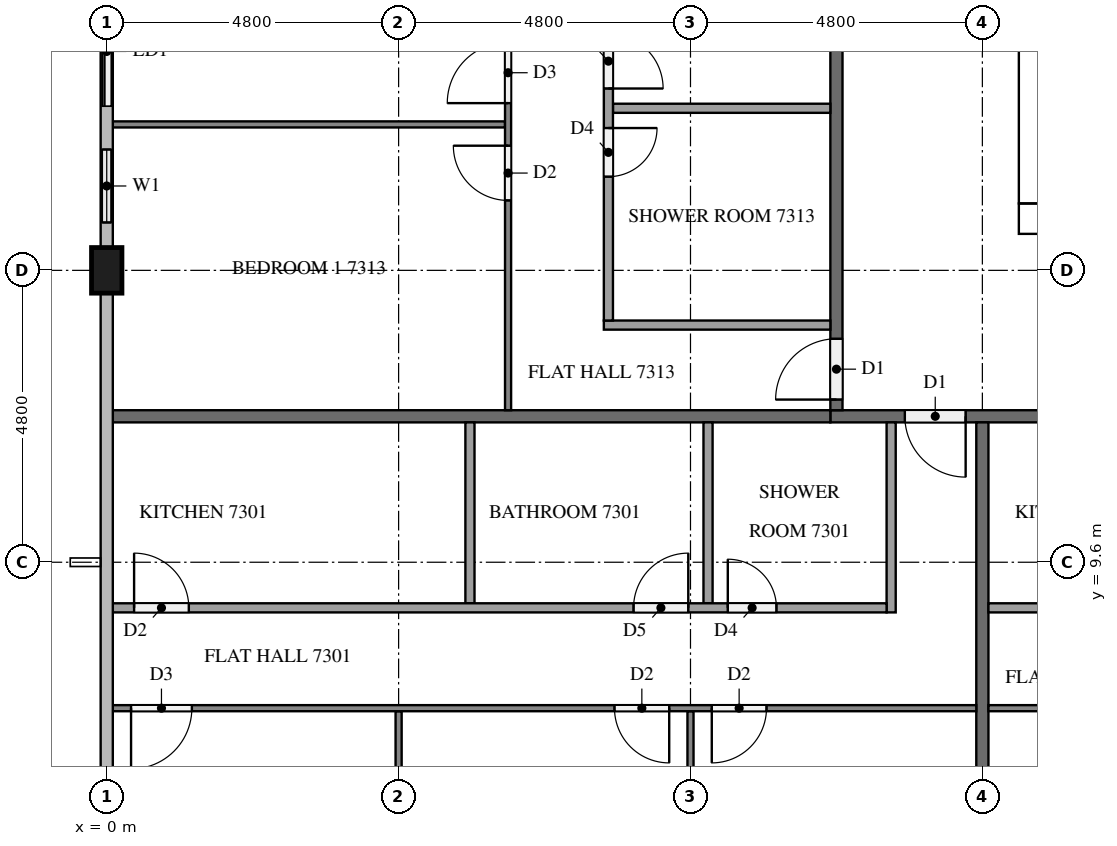
"""IFC4 building model, lengths in metres.
Left out: names, types, materials, properties, quantities, classifications, styles, units other than length and angle.
Written with IfcOpenShell. Run it as: python <this file> out.ifc"""

import sys

from ifc_helpers import new_model, si_unit, direction, frame, frame_2d, origin, origin_2d, place, context, subcontext, project, spatial, rectangle, extrude, element, fill, save


model = new_model("IFC4")
c1 = context("Model", 3, precision=1e-05, world=origin(), true_north=direction((0.0, 1.0)))
c2 = subcontext(c1, "Body", "Model", "MODEL_VIEW")
j1 = project(units=[si_unit("LENGTHUNIT", "METRE"), si_unit("PLANEANGLEUNIT", "RADIAN")], contexts=[c1])
p1 = place(None, origin())
s1 = spatial("IfcSite", under=j1, at=p1, CompositionType="ELEMENT")
p2 = place(p1, origin())
s2 = spatial("IfcBuilding", under=s1, at=p2, CompositionType="ELEMENT")
p3 = place(p2, frame((0.0, 0.0, 279.1)))
s3 = spatial("IfcBuildingStorey", under=s2, at=p3, CompositionType="ELEMENT", Elevation=279.1)
p4 = place(p3, frame((15.0, 15.25, 0.0), z_axis=(0.0, 0.0, 1.0), x_axis=(1.0, 0.0, 0.0)))
e1 = element("IfcWall", 1, at=p4, inside=s3, PredefinedType="SHEAR", context=c2, shape_type="SweptSolid", body=[
    extrude(rectangle(XDim=32.4, YDim=0.5, at=frame_2d((16.2, 0.0))), origin(), (0.0, 0.0, 1.0), 3.2),
])
p5 = place(p4, frame((15.3, 0.0, 0.0)))
e2 = element("IfcOpeningElement", 2, at=p5, cuts=e1, PredefinedType="OPENING", context=c2, shape_type="SweptSolid", body=[
    extrude(rectangle(XDim=1.8, YDim=2.1, at=frame_2d((0.9, 1.05))), frame((0.0, 0.26, 0.0), z_axis=(0.0, -1.0, 0.0), x_axis=(1.0, 0.0, 0.0)), (0.0, 0.0, 1.0), 0.52),
])
p6 = place(p3, frame((15.25, 15.5, 0.0), z_axis=(0.0, 0.0, 1.0), x_axis=(0.0, 1.0, 0.0)))
e3 = element("IfcWall", 3, at=p6, inside=s3, PredefinedType="SHEAR", context=c2, shape_type="SweptSolid", body=[
    extrude(rectangle(XDim=21.8, YDim=0.5, at=frame_2d((10.9, 0.0))), origin(), (0.0, 0.0, 1.0), 3.2),
])
p7 = place(p6, frame((5.26, 0.0, 0.0)))
e4 = element("IfcOpeningElement", 4, at=p7, cuts=e3, PredefinedType="OPENING", context=c2, shape_type="SweptSolid", body=[
    extrude(rectangle(XDim=1.2, YDim=2.1, at=frame_2d((0.6, 1.05))), frame((0.0, 0.26, 0.0), z_axis=(0.0, -1.0, 0.0), x_axis=(1.0, 0.0, 0.0)), (0.0, 0.0, 1.0), 0.52),
])
p8 = place(p3, frame((0.0, 14.4, 0.0), z_axis=(0.0, 0.0, 1.0), x_axis=(0.0, 1.0, 0.0)))
e5 = element("IfcColumn", 5, at=p8, inside=s3, PredefinedType="COLUMN", context=c2, shape_type="SweptSolid", body=[
    extrude(rectangle(XDim=0.75, YDim=0.5, at=origin_2d()), origin(), (0.0, 0.0, 1.0), 3.2),
])
p9 = place(p3, frame((0.0, 19.2, 0.0), z_axis=(0.0, 0.0, 1.0), x_axis=(0.0, -1.0, 0.0)))
e6 = element("IfcWall", 6, at=p9, inside=s3, PredefinedType="SOLIDWALL", context=c2, shape_type="SweptSolid", body=[
    extrude(rectangle(XDim=4.425, YDim=0.15, at=frame_2d((2.212, 0.0))), origin(), (0.0, 0.0, 1.0), 3.2),
])
p10 = place(p9, frame((0.3, 0.0, 0.0)))
e7 = element("IfcOpeningElement", 7, at=p10, cuts=e6, PredefinedType="OPENING", context=c2, shape_type="SweptSolid", body=[
    extrude(rectangle(XDim=1.8, YDim=2.4, at=frame_2d((0.9, 1.2))), frame((0.0, 0.085, 0.0), z_axis=(0.0, -1.0, 0.0), x_axis=(1.0, 0.0, 0.0)), (0.0, 0.0, 1.0), 0.17),
])
p11 = place(p9, frame((2.812, 0.0, 0.9)))
e8 = element("IfcOpeningElement", 8, at=p11, cuts=e6, PredefinedType="OPENING", context=c2, shape_type="SweptSolid", body=[
    extrude(rectangle(XDim=1.2, YDim=1.4, at=frame_2d((0.6, 0.7))), frame((0.0, 0.085, 0.0), z_axis=(0.0, -1.0, 0.0), x_axis=(1.0, 0.0, 0.0)), (0.0, 0.0, 1.0), 0.17),
])
p12 = place(p3, frame((50.5, 12.0, 0.0), z_axis=(0.0, 0.0, 1.0), x_axis=(-1.0, 0.0, 0.0)))
e9 = element("IfcWall", 9, at=p12, inside=s3, PredefinedType="PARTITIONING", context=c2, shape_type="SweptSolid", body=[
    extrude(rectangle(XDim=38.6, YDim=0.2, at=frame_2d((19.3, 0.0))), origin(), (0.0, 0.0, 1.0), 3.2),
])
p13 = place(p12, frame((36.375, 0.0, 0.0)))
e10 = element("IfcOpeningElement", 10, at=p13, cuts=e9, PredefinedType="OPENING", context=c2, shape_type="SweptSolid", body=[
    extrude(rectangle(XDim=1.0, YDim=2.1, at=frame_2d((0.5, 1.05))), frame((0.0, 0.11, 0.0), z_axis=(0.0, -1.0, 0.0), x_axis=(1.0, 0.0, 0.0)), (0.0, 0.0, 1.0), 0.22),
])
p14 = place(p12, frame((29.175, 0.0, 0.0)))
e11 = element("IfcOpeningElement", 11, at=p14, cuts=e9, PredefinedType="OPENING", context=c2, shape_type="SweptSolid", body=[
    extrude(rectangle(XDim=1.0, YDim=2.1, at=frame_2d((0.5, 1.05))), frame((0.0, 0.11, 0.0), z_axis=(0.0, -1.0, 0.0), x_axis=(1.0, 0.0, 0.0)), (0.0, 0.0, 1.0), 0.22),
])
p15 = place(p12, frame((27.625, 0.0, 0.0)))
e12 = element("IfcOpeningElement", 12, at=p15, cuts=e9, PredefinedType="OPENING", context=c2, shape_type="SweptSolid", body=[
    extrude(rectangle(XDim=1.0, YDim=2.1, at=frame_2d((0.5, 1.05))), frame((0.0, 0.11, 0.0), z_axis=(0.0, -1.0, 0.0), x_axis=(1.0, 0.0, 0.0)), (0.0, 0.0, 1.0), 0.22),
])
p16 = place(p12, frame((2.775, 0.0, 0.0)))
e13 = element("IfcOpeningElement", 13, at=p16, cuts=e9, PredefinedType="OPENING", context=c2, shape_type="SweptSolid", body=[
    extrude(rectangle(XDim=1.0, YDim=2.1, at=frame_2d((0.5, 1.05))), frame((0.0, 0.11, 0.0), z_axis=(0.0, -1.0, 0.0), x_axis=(1.0, 0.0, 0.0)), (0.0, 0.0, 1.0), 0.22),
])
p17 = place(p12, frame((1.225, 0.0, 0.0)))
e14 = element("IfcOpeningElement", 14, at=p17, cuts=e9, PredefinedType="OPENING", context=c2, shape_type="SweptSolid", body=[
    extrude(rectangle(XDim=1.0, YDim=2.1, at=frame_2d((0.5, 1.05))), frame((0.0, 0.11, 0.0), z_axis=(0.0, -1.0, 0.0), x_axis=(1.0, 0.0, 0.0)), (0.0, 0.0, 1.0), 0.22),
])
p18 = place(p3, frame((12.0, 12.1, 0.0), z_axis=(0.0, 0.0, 1.0), x_axis=(0.0, 1.0, 0.0)))
e15 = element("IfcWall", 15, at=p18, inside=s3, PredefinedType="PARTITIONING", context=c2, shape_type="SweptSolid", body=[
    extrude(rectangle(XDim=28.6, YDim=0.2, at=frame_2d((14.3, 0.0))), origin(), (0.0, 0.0, 1.0), 3.2),
])
p19 = place(p18, frame((16.975, 0.0, 0.0)))
e16 = element("IfcOpeningElement", 16, at=p19, cuts=e15, PredefinedType="OPENING", context=c2, shape_type="SweptSolid", body=[
    extrude(rectangle(XDim=1.0, YDim=2.1, at=frame_2d((0.5, 1.05))), frame((0.0, 0.11, 0.0), z_axis=(0.0, -1.0, 0.0), x_axis=(1.0, 0.0, 0.0)), (0.0, 0.0, 1.0), 0.22),
])
p20 = place(p18, frame((0.175, 0.0, 0.0)))
e17 = element("IfcOpeningElement", 17, at=p20, cuts=e15, PredefinedType="OPENING", context=c2, shape_type="SweptSolid", body=[
    extrude(rectangle(XDim=1.0, YDim=2.1, at=frame_2d((0.5, 1.05))), frame((0.0, 0.11, 0.0), z_axis=(0.0, -1.0, 0.0), x_axis=(1.0, 0.0, 0.0)), (0.0, 0.0, 1.0), 0.22),
])
p21 = place(p3, frame((14.4, 11.9, 0.0), z_axis=(0.0, 0.0, 1.0), x_axis=(0.0, -1.0, 0.0)))
e18 = element("IfcWall", 18, at=p21, inside=s3, PredefinedType="PARTITIONING", context=c2, shape_type="SweptSolid", body=[
    extrude(rectangle(XDim=11.65, YDim=0.2, at=frame_2d((5.825, 0.0))), origin(), (0.0, 0.0, 1.0), 3.2),
])
p22 = place(p3, frame((0.1, 12.0, 0.0), z_axis=(0.0, 0.0, 1.0), x_axis=(1.0, 0.0, 0.0)))
e19 = element("IfcWall", 19, at=p22, inside=s3, PredefinedType="PARTITIONING", context=c2, shape_type="SweptSolid", body=[
    extrude(rectangle(XDim=11.8, YDim=0.2, at=frame_2d((5.9, 0.0))), origin(), (0.0, 0.0, 1.0), 3.2),
])
p23 = place(p3, frame((9.6, 7.15, 0.0), z_axis=(0.0, 0.0, 1.0), x_axis=(0.0, -1.0, 0.0)))
e20 = element("IfcWall", 20, at=p23, inside=s3, PredefinedType="PARTITIONING", context=c2, shape_type="SweptSolid", body=[
    extrude(rectangle(XDim=7.05, YDim=0.1, at=frame_2d((3.525, 0.0))), origin(), (0.0, 0.0, 1.0), 3.2),
])
p24 = place(p3, frame((4.8, 7.15, 0.0), z_axis=(0.0, 0.0, 1.0), x_axis=(0.0, -1.0, 0.0)))
e21 = element("IfcWall", 21, at=p24, inside=s3, PredefinedType="PARTITIONING", context=c2, shape_type="SweptSolid", body=[
    extrude(rectangle(XDim=6.85, YDim=0.1, at=frame_2d((3.425, 0.0))), origin(), (0.0, 0.0, 1.0), 3.2),
])
p25 = place(p3, frame((14.3, 7.2, 0.0), z_axis=(0.0, 0.0, 1.0), x_axis=(-1.0, 0.0, 0.0)))
e22 = element("IfcWall", 22, at=p25, inside=s3, PredefinedType="PARTITIONING", context=c2, shape_type="SweptSolid", body=[
    extrude(rectangle(XDim=14.2, YDim=0.1, at=frame_2d((7.1, 0.0))), origin(), (0.0, 0.0, 1.0), 3.2),
])
p26 = place(p25, frame((3.45, 0.0, 0.0)))
e23 = element("IfcOpeningElement", 23, at=p26, cuts=e22, PredefinedType="OPENING", context=c2, shape_type="SweptSolid", body=[
    extrude(rectangle(XDim=0.9, YDim=2.1, at=frame_2d((0.45, 1.05))), frame((0.0, 0.06, 0.0), z_axis=(0.0, -1.0, 0.0), x_axis=(1.0, 0.0, 0.0)), (0.0, 0.0, 1.0), 0.12),
])
p27 = place(p25, frame((5.05, 0.0, 0.0)))
e24 = element("IfcOpeningElement", 24, at=p27, cuts=e22, PredefinedType="OPENING", context=c2, shape_type="SweptSolid", body=[
    extrude(rectangle(XDim=0.9, YDim=2.1, at=frame_2d((0.45, 1.05))), frame((0.0, 0.06, 0.0), z_axis=(0.0, -1.0, 0.0), x_axis=(1.0, 0.0, 0.0)), (0.0, 0.0, 1.0), 0.12),
])
p28 = place(p25, frame((12.9, 0.0, 0.0)))
e25 = element("IfcOpeningElement", 25, at=p28, cuts=e22, PredefinedType="OPENING", context=c2, shape_type="SweptSolid", body=[
    extrude(rectangle(XDim=1.0, YDim=2.1, at=frame_2d((0.5, 1.05))), frame((0.0, 0.06, 0.0), z_axis=(0.0, -1.0, 0.0), x_axis=(1.0, 0.0, 0.0)), (0.0, 0.0, 1.0), 0.12),
])
for number, where, z_axis, x_axis in (
    (26, (9.888, 11.9, 0.0), (0.0, 0.0, 1.0), (0.0, -1.0, 0.0)),
    (27, (5.973, 11.9, 0.0), (0.0, 0.0, 1.0), (0.0, -1.0, 0.0)),
):
    element("IfcWall", number, at=place(p3, frame(where, z_axis=z_axis, x_axis=x_axis)), inside=s3, PredefinedType="PARTITIONING", context=c2, shape_type="SweptSolid", body=[
        extrude(rectangle(XDim=2.975, YDim=0.15, at=frame_2d((1.487, 0.0))), origin(), (0.0, 0.0, 1.0), 3.2),
    ])
p29 = place(p3, frame((12.9, 11.9, 0.0), z_axis=(0.0, 0.0, 1.0), x_axis=(0.0, -1.0, 0.0)))
e28 = element("IfcWall", 28, at=p29, inside=s3, PredefinedType="PARTITIONING", context=c2, shape_type="SweptSolid", body=[
    extrude(rectangle(XDim=3.125, YDim=0.15, at=frame_2d((1.562, 0.0))), origin(), (0.0, 0.0, 1.0), 3.2),
])
p30 = place(p3, frame((0.1, 8.85, 0.0), z_axis=(0.0, 0.0, 1.0), x_axis=(1.0, 0.0, 0.0)))
e29 = element("IfcWall", 29, at=p30, inside=s3, PredefinedType="PARTITIONING", context=c2, shape_type="SweptSolid", body=[
    extrude(rectangle(XDim=12.725, YDim=0.15, at=frame_2d((6.362, 0.0))), origin(), (0.0, 0.0, 1.0), 3.2),
])
p31 = place(p30, frame((10.114, 0.0, 0.0)))
e30 = element("IfcOpeningElement", 30, at=p31, cuts=e29, PredefinedType="OPENING", context=c2, shape_type="SweptSolid", body=[
    extrude(rectangle(XDim=0.8, YDim=2.1, at=frame_2d((0.4, 1.05))), frame((0.0, 0.085, 0.0), z_axis=(0.0, -1.0, 0.0), x_axis=(1.0, 0.0, 0.0)), (0.0, 0.0, 1.0), 0.17),
])
p32 = place(p30, frame((8.563, 0.0, 0.0)))
e31 = element("IfcOpeningElement", 31, at=p32, cuts=e29, PredefinedType="OPENING", context=c2, shape_type="SweptSolid", body=[
    extrude(rectangle(XDim=0.9, YDim=2.1, at=frame_2d((0.45, 1.05))), frame((0.0, 0.085, 0.0), z_axis=(0.0, -1.0, 0.0), x_axis=(1.0, 0.0, 0.0)), (0.0, 0.0, 1.0), 0.17),
])
p33 = place(p30, frame((0.35, 0.0, 0.0)))
e32 = element("IfcOpeningElement", 32, at=p33, cuts=e29, PredefinedType="OPENING", context=c2, shape_type="SweptSolid", body=[
    extrude(rectangle(XDim=0.9, YDim=2.1, at=frame_2d((0.45, 1.05))), frame((0.0, 0.085, 0.0), z_axis=(0.0, -1.0, 0.0), x_axis=(1.0, 0.0, 0.0)), (0.0, 0.0, 1.0), 0.17),
])
p34 = place(p3, frame((21.5, 7.2, 0.0), z_axis=(0.0, 0.0, 1.0), x_axis=(-1.0, 0.0, 0.0)))
e33 = element("IfcWall", 33, at=p34, inside=s3, PredefinedType="PARTITIONING", context=c2, shape_type="SweptSolid", body=[
    extrude(rectangle(XDim=7.0, YDim=0.1, at=frame_2d((3.5, 0.0))), origin(), (0.0, 0.0, 1.0), 3.2),
])
p35 = place(p34, frame((0.3, 0.0, 0.0)))
e34 = element("IfcOpeningElement", 34, at=p35, cuts=e33, PredefinedType="OPENING", context=c2, shape_type="SweptSolid", body=[
    extrude(rectangle(XDim=1.0, YDim=2.1, at=frame_2d((0.5, 1.05))), frame((0.0, 0.06, 0.0), z_axis=(0.0, -1.0, 0.0), x_axis=(1.0, 0.0, 0.0)), (0.0, 0.0, 1.0), 0.12),
])
p36 = place(p3, frame((14.5, 8.85, 0.0), z_axis=(0.0, 0.0, 1.0), x_axis=(1.0, 0.0, 0.0)))
e35 = element("IfcWall", 35, at=p36, inside=s3, PredefinedType="PARTITIONING", context=c2, shape_type="SweptSolid", body=[
    extrude(rectangle(XDim=5.525, YDim=0.15, at=frame_2d((2.762, 0.0))), origin(), (0.0, 0.0, 1.0), 3.2),
])
p37 = place(p36, frame((3.64, 0.0, 0.0)))
e36 = element("IfcOpeningElement", 36, at=p37, cuts=e35, PredefinedType="OPENING", context=c2, shape_type="SweptSolid", body=[
    extrude(rectangle(XDim=0.8, YDim=2.1, at=frame_2d((0.4, 1.05))), frame((0.0, 0.085, 0.0), z_axis=(0.0, -1.0, 0.0), x_axis=(1.0, 0.0, 0.0)), (0.0, 0.0, 1.0), 0.17),
])
p38 = place(p36, frame((2.09, 0.0, 0.0)))
e37 = element("IfcOpeningElement", 37, at=p38, cuts=e35, PredefinedType="OPENING", context=c2, shape_type="SweptSolid", body=[
    extrude(rectangle(XDim=0.9, YDim=2.1, at=frame_2d((0.45, 1.05))), frame((0.0, 0.085, 0.0), z_axis=(0.0, -1.0, 0.0), x_axis=(1.0, 0.0, 0.0)), (0.0, 0.0, 1.0), 0.17),
])
p39 = place(p3, frame((6.55, 16.8, 0.0), z_axis=(0.0, 0.0, 1.0), x_axis=(-1.0, 0.0, 0.0)))
e38 = element("IfcWall", 38, at=p39, inside=s3, PredefinedType="PARTITIONING", context=c2, shape_type="SweptSolid", body=[
    extrude(rectangle(XDim=6.45, YDim=0.1, at=frame_2d((3.225, 0.0))), origin(), (0.0, 0.0, 1.0), 3.2),
])
p40 = place(p3, frame((6.6, 12.1, 0.0), z_axis=(0.0, 0.0, 1.0), x_axis=(0.0, 1.0, 0.0)))
e39 = element("IfcWall", 39, at=p40, inside=s3, PredefinedType="PARTITIONING", context=c2, shape_type="SweptSolid", body=[
    extrude(rectangle(XDim=16.6, YDim=0.1, at=frame_2d((8.3, 0.0))), origin(), (0.0, 0.0, 1.0), 3.2),
])
p41 = place(p40, frame((3.45, 0.0, 0.0)))
e40 = element("IfcOpeningElement", 40, at=p41, cuts=e39, PredefinedType="OPENING", context=c2, shape_type="SweptSolid", body=[
    extrude(rectangle(XDim=0.9, YDim=2.1, at=frame_2d((0.45, 1.05))), frame((0.0, 0.06, 0.0), z_axis=(0.0, -1.0, 0.0), x_axis=(1.0, 0.0, 0.0)), (0.0, 0.0, 1.0), 0.12),
])
p42 = place(p40, frame((5.05, 0.0, 0.0)))
e41 = element("IfcOpeningElement", 41, at=p42, cuts=e39, PredefinedType="OPENING", context=c2, shape_type="SweptSolid", body=[
    extrude(rectangle(XDim=1.0, YDim=2.1, at=frame_2d((0.5, 1.05))), frame((0.0, 0.06, 0.0), z_axis=(0.0, -1.0, 0.0), x_axis=(1.0, 0.0, 0.0)), (0.0, 0.0, 1.0), 0.12),
])
p43 = place(p40, frame((15.4, 0.0, 0.0)))
e42 = element("IfcOpeningElement", 42, at=p43, cuts=e39, PredefinedType="OPENING", context=c2, shape_type="SweptSolid", body=[
    extrude(rectangle(XDim=0.9, YDim=2.1, at=frame_2d((0.45, 1.05))), frame((0.0, 0.06, 0.0), z_axis=(0.0, -1.0, 0.0), x_axis=(1.0, 0.0, 0.0)), (0.0, 0.0, 1.0), 0.12),
])
p44 = place(p3, frame((11.9, 17.065, 0.0), z_axis=(0.0, 0.0, 1.0), x_axis=(-1.0, 0.0, 0.0)))
e43 = element("IfcWall", 43, at=p44, inside=s3, PredefinedType="PARTITIONING", context=c2, shape_type="SweptSolid", body=[
    extrude(rectangle(XDim=3.575, YDim=0.15, at=frame_2d((1.788, 0.0))), origin(), (0.0, 0.0, 1.0), 3.2),
])
p45 = place(p3, frame((11.9, 13.5, 0.0), z_axis=(0.0, 0.0, 1.0), x_axis=(-1.0, 0.0, 0.0)))
e44 = element("IfcWall", 44, at=p45, inside=s3, PredefinedType="PARTITIONING", context=c2, shape_type="SweptSolid", body=[
    extrude(rectangle(XDim=3.725, YDim=0.15, at=frame_2d((1.862, 0.0))), origin(), (0.0, 0.0, 1.0), 3.2),
])
p46 = place(p3, frame((8.25, 28.7, 0.0), z_axis=(0.0, 0.0, 1.0), x_axis=(0.0, -1.0, 0.0)))
e45 = element("IfcWall", 45, at=p46, inside=s3, PredefinedType="PARTITIONING", context=c2, shape_type="SweptSolid", body=[
    extrude(rectangle(XDim=15.125, YDim=0.15, at=frame_2d((7.562, 0.0))), origin(), (0.0, 0.0, 1.0), 3.2),
])
p47 = place(p46, frame((11.96, 0.0, 0.0)))
e46 = element("IfcOpeningElement", 46, at=p47, cuts=e45, PredefinedType="OPENING", context=c2, shape_type="SweptSolid", body=[
    extrude(rectangle(XDim=0.8, YDim=2.1, at=frame_2d((0.4, 1.05))), frame((0.0, 0.085, 0.0), z_axis=(0.0, -1.0, 0.0), x_axis=(1.0, 0.0, 0.0)), (0.0, 0.0, 1.0), 0.17),
])
p48 = place(p46, frame((10.41, 0.0, 0.0)))
e47 = element("IfcOpeningElement", 47, at=p48, cuts=e45, PredefinedType="OPENING", context=c2, shape_type="SweptSolid", body=[
    extrude(rectangle(XDim=0.9, YDim=2.1, at=frame_2d((0.45, 1.05))), frame((0.0, 0.085, 0.0), z_axis=(0.0, -1.0, 0.0), x_axis=(1.0, 0.0, 0.0)), (0.0, 0.0, 1.0), 0.17),
])
p49 = place(p46, frame((0.35, 0.0, 0.0)))
e48 = element("IfcOpeningElement", 48, at=p49, cuts=e45, PredefinedType="OPENING", context=c2, shape_type="SweptSolid", body=[
    extrude(rectangle(XDim=0.9, YDim=2.1, at=frame_2d((0.45, 1.05))), frame((0.0, 0.085, 0.0), z_axis=(0.0, -1.0, 0.0), x_axis=(1.0, 0.0, 0.0)), (0.0, 0.0, 1.0), 0.17),
])
p50 = place(p10, origin())
e49 = element("IfcDoor", 49, at=p50, inside=s3, OperationType="SLIDING_TO_LEFT", PredefinedType="DOOR", context=c2, shape_type="SweptSolid", body=[
    extrude(rectangle(XDim=1.8, YDim=2.4, at=frame_2d((0.9, 1.2))), frame((0.0, 0.025, 0.0), z_axis=(0.0, -1.0, 0.0), x_axis=(1.0, 0.0, 0.0)), (0.0, 0.0, 1.0), 0.05),
])
fill(e7, e49)
p51 = place(p11, origin())
e50 = element("IfcWindow", 50, at=p51, inside=s3, PartitioningType="SINGLE_PANEL", PredefinedType="WINDOW", context=c2, shape_type="SweptSolid", body=[
    extrude(rectangle(XDim=1.2, YDim=1.4, at=frame_2d((0.6, 0.7))), frame((0.0, 0.03, 0.0), z_axis=(0.0, -1.0, 0.0), x_axis=(1.0, 0.0, 0.0)), (0.0, 0.0, 1.0), 0.06),
])
fill(e8, e50)
p52 = place(p13, origin())
e51 = element("IfcDoor", 51, at=p52, inside=s3, OperationType="SINGLE_SWING_LEFT", PredefinedType="DOOR", context=c2, shape_type="SweptSolid", body=[
    extrude(rectangle(XDim=1.0, YDim=2.1, at=frame_2d((0.5, 1.05))), frame((0.0, 0.025, 0.0), z_axis=(0.0, -1.0, 0.0), x_axis=(1.0, 0.0, 0.0)), (0.0, 0.0, 1.0), 0.05),
])
fill(e10, e51)
p53 = place(p20, origin())
e52 = element("IfcDoor", 52, at=p53, inside=s3, OperationType="SINGLE_SWING_LEFT", PredefinedType="DOOR", context=c2, shape_type="SweptSolid", body=[
    extrude(rectangle(XDim=1.0, YDim=2.1, at=frame_2d((0.5, 1.05))), frame((0.0, 0.025, 0.0), z_axis=(0.0, -1.0, 0.0), x_axis=(1.0, 0.0, 0.0)), (0.0, 0.0, 1.0), 0.05),
])
fill(e17, e52)
p54 = place(p26, origin())
e53 = element("IfcDoor", 53, at=p54, inside=s3, OperationType="SINGLE_SWING_RIGHT", PredefinedType="DOOR", context=c2, shape_type="SweptSolid", body=[
    extrude(rectangle(XDim=0.9, YDim=2.1, at=frame_2d((0.45, 1.05))), frame((0.0, 0.025, 0.0), z_axis=(0.0, -1.0, 0.0), x_axis=(1.0, 0.0, 0.0)), (0.0, 0.0, 1.0), 0.05),
])
fill(e23, e53)
p55 = place(p27, origin())
e54 = element("IfcDoor", 54, at=p55, inside=s3, OperationType="SINGLE_SWING_LEFT", PredefinedType="DOOR", context=c2, shape_type="SweptSolid", body=[
    extrude(rectangle(XDim=0.9, YDim=2.1, at=frame_2d((0.45, 1.05))), frame((0.0, 0.025, 0.0), z_axis=(0.0, -1.0, 0.0), x_axis=(1.0, 0.0, 0.0)), (0.0, 0.0, 1.0), 0.05),
])
fill(e24, e54)
p56 = place(p28, origin())
e55 = element("IfcDoor", 55, at=p56, inside=s3, OperationType="SINGLE_SWING_RIGHT", PredefinedType="DOOR", context=c2, shape_type="SweptSolid", body=[
    extrude(rectangle(XDim=1.0, YDim=2.1, at=frame_2d((0.5, 1.05))), frame((0.0, 0.025, 0.0), z_axis=(0.0, -1.0, 0.0), x_axis=(1.0, 0.0, 0.0)), (0.0, 0.0, 1.0), 0.05),
])
fill(e25, e55)
p57 = place(p31, origin())
e56 = element("IfcDoor", 56, at=p57, inside=s3, OperationType="SINGLE_SWING_LEFT", PredefinedType="DOOR", context=c2, shape_type="SweptSolid", body=[
    extrude(rectangle(XDim=0.8, YDim=2.1, at=frame_2d((0.4, 1.05))), frame((0.0, 0.025, 0.0), z_axis=(0.0, -1.0, 0.0), x_axis=(1.0, 0.0, 0.0)), (0.0, 0.0, 1.0), 0.05),
])
fill(e30, e56)
p58 = place(p32, origin())
e57 = element("IfcDoor", 57, at=p58, inside=s3, OperationType="SINGLE_SWING_RIGHT", PredefinedType="DOOR", context=c2, shape_type="SweptSolid", body=[
    extrude(rectangle(XDim=0.9, YDim=2.1, at=frame_2d((0.45, 1.05))), frame((0.0, 0.025, 0.0), z_axis=(0.0, -1.0, 0.0), x_axis=(1.0, 0.0, 0.0)), (0.0, 0.0, 1.0), 0.05),
])
fill(e31, e57)
p59 = place(p33, origin())
e58 = element("IfcDoor", 58, at=p59, inside=s3, OperationType="SINGLE_SWING_LEFT", PredefinedType="DOOR", context=c2, shape_type="SweptSolid", body=[
    extrude(rectangle(XDim=0.9, YDim=2.1, at=frame_2d((0.45, 1.05))), frame((0.0, 0.025, 0.0), z_axis=(0.0, -1.0, 0.0), x_axis=(1.0, 0.0, 0.0)), (0.0, 0.0, 1.0), 0.05),
])
fill(e32, e58)
p60 = place(p41, origin())
e59 = element("IfcDoor", 59, at=p60, inside=s3, OperationType="SINGLE_SWING_RIGHT", PredefinedType="DOOR", context=c2, shape_type="SweptSolid", body=[
    extrude(rectangle(XDim=0.9, YDim=2.1, at=frame_2d((0.45, 1.05))), frame((0.0, 0.025, 0.0), z_axis=(0.0, -1.0, 0.0), x_axis=(1.0, 0.0, 0.0)), (0.0, 0.0, 1.0), 0.05),
])
fill(e40, e59)
p61 = place(p42, origin())
e60 = element("IfcDoor", 60, at=p61, inside=s3, OperationType="SINGLE_SWING_LEFT", PredefinedType="DOOR", context=c2, shape_type="SweptSolid", body=[
    extrude(rectangle(XDim=1.0, YDim=2.1, at=frame_2d((0.5, 1.05))), frame((0.0, 0.025, 0.0), z_axis=(0.0, -1.0, 0.0), x_axis=(1.0, 0.0, 0.0)), (0.0, 0.0, 1.0), 0.05),
])
fill(e41, e60)
p62 = place(p47, origin())
e61 = element("IfcDoor", 61, at=p62, inside=s3, OperationType="SINGLE_SWING_LEFT", PredefinedType="DOOR", context=c2, shape_type="SweptSolid", body=[
    extrude(rectangle(XDim=0.8, YDim=2.1, at=frame_2d((0.4, 1.05))), frame((0.0, 0.025, 0.0), z_axis=(0.0, -1.0, 0.0), x_axis=(1.0, 0.0, 0.0)), (0.0, 0.0, 1.0), 0.05),
])
fill(e46, e61)
p63 = place(p48, origin())
e62 = element("IfcDoor", 62, at=p63, inside=s3, OperationType="SINGLE_SWING_RIGHT", PredefinedType="DOOR", context=c2, shape_type="SweptSolid", body=[
    extrude(rectangle(XDim=0.9, YDim=2.1, at=frame_2d((0.45, 1.05))), frame((0.0, 0.025, 0.0), z_axis=(0.0, -1.0, 0.0), x_axis=(1.0, 0.0, 0.0)), (0.0, 0.0, 1.0), 0.05),
])
fill(e47, e62)
save(model, sys.argv[1])
